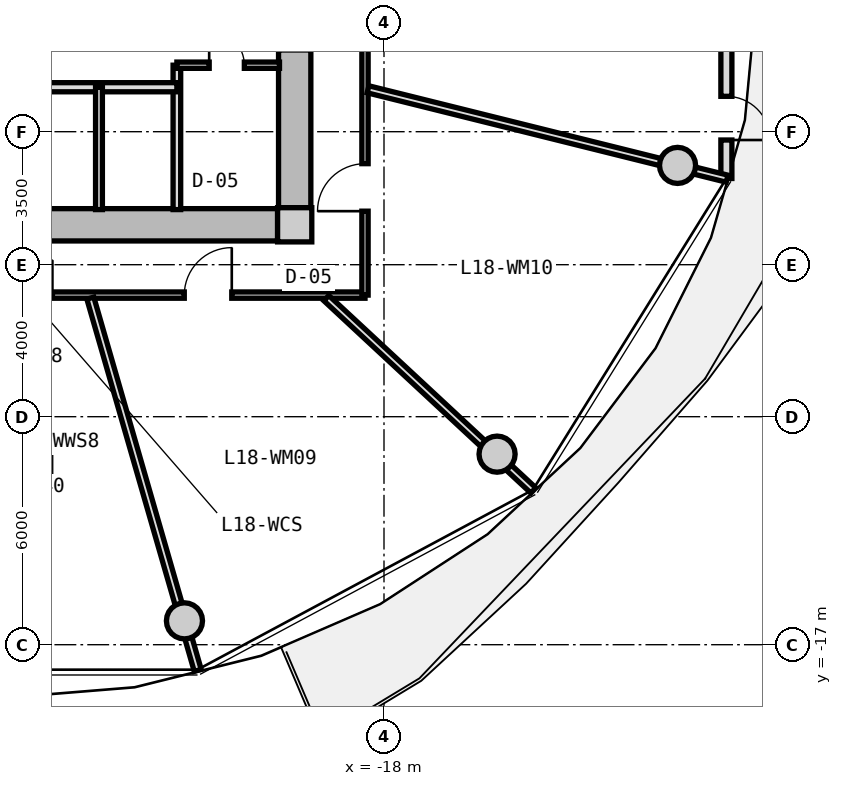
"""IFC4 building model, lengths in metres.
Left out: names, types, materials, properties, quantities, classifications, styles, units other than length and angle.
Written with IfcOpenShell. Run it as: python <this file> out.ifc"""

import sys

from ifc_helpers import new_model, si_unit, direction, frame, frame_2d, origin, origin_2d, place, context, subcontext, project, spatial, rectangle, circle, extrude, source, transform, mapped, element, fill, save


model = new_model("IFC4")
c1 = context("Model", 3, precision=1e-05, world=origin(), true_north=direction((0.0, 1.0)))
c2 = subcontext(c1, "Body", "Model", "MODEL_VIEW")
j1 = project(units=[si_unit("LENGTHUNIT", "METRE"), si_unit("PLANEANGLEUNIT", "RADIAN")], contexts=[c1])
p1 = place(None, origin())
s1 = spatial("IfcSite", under=j1, at=p1, CompositionType="ELEMENT")
p2 = place(p1, origin())
s2 = spatial("IfcBuilding", under=s1, at=p2, CompositionType="ELEMENT")
p3 = place(p2, frame((0.0, 0.0, 61.25)))
s3 = spatial("IfcBuildingStorey", under=s2, at=p3, CompositionType="ELEMENT", Elevation=61.25)
m1 = source(origin(), c2, "Body", "SweptSolid", [
    extrude(rectangle(XDim=0.9, YDim=0.9, at=origin_2d()), origin(), (0.0, 0.0, 1.0), 3.05),
])
p4 = place(p3, frame((-20.35, -5.95, 0.0), z_axis=(0.0, 0.0, 1.0), x_axis=(1.0, 0.0, 0.0)))
e1 = element("IfcColumn", 1, at=p4, inside=s3, PredefinedType="COLUMN", context=c2, shape_type="MappedRepresentation", body=[
    mapped(m1, transform((0.0, 0.0, 0.0), x_axis=(1.0, 0.0, 0.0), y_axis=(0.0, 1.0, 0.0), z_axis=(0.0, 0.0, 1.0), scale=1.0)),
])
m2 = source(origin(), c2, "Body", "SweptSolid", [
    extrude(rectangle(XDim=14.4, YDim=0.85, at=frame_2d((7.2, 0.0))), origin(), (0.0, 0.0, 1.0), 2.79),
])
p5 = place(p3, frame((-20.8, -5.95, 0.0), z_axis=(0.0, 0.0, 1.0), x_axis=(-1.0, 0.0, 0.0)))
e2 = element("IfcWall", 2, at=p5, inside=s3, PredefinedType="SHEAR", context=c2, shape_type="MappedRepresentation", body=[
    mapped(m2, transform((0.0, 0.0, 0.0), x_axis=(1.0, 0.0, 0.0), y_axis=(0.0, 1.0, 0.0), z_axis=(0.0, 0.0, 1.0), scale=1.0)),
])
m3 = source(origin(), c2, "Body", "SweptSolid", [
    extrude(rectangle(XDim=11.0, YDim=0.85, at=frame_2d((5.5, 0.0))), origin(), (0.0, 0.0, 1.0), 2.79),
])
p6 = place(p3, frame((-20.35, 5.5, 0.0), z_axis=(0.0, 0.0, 1.0), x_axis=(0.0, -1.0, 0.0)))
e3 = element("IfcWall", 3, at=p6, inside=s3, PredefinedType="SHEAR", context=c2, shape_type="MappedRepresentation", body=[
    mapped(m3, transform((0.0, 0.0, 0.0), x_axis=(1.0, 0.0, 0.0), y_axis=(0.0, 1.0, 0.0), z_axis=(0.0, 0.0, 1.0), scale=1.0)),
])
p7 = place(p6, frame((5.65, 0.0, 0.0)))
e4 = element("IfcOpeningElement", 4, at=p7, cuts=e3, PredefinedType="OPENING", context=c2, shape_type="SweptSolid", body=[
    extrude(rectangle(XDim=1.2, YDim=2.15, at=frame_2d((0.6, 1.075))), frame((0.0, 0.435, 0.0), z_axis=(0.0, -1.0, 0.0), x_axis=(1.0, 0.0, 0.0)), (0.0, 0.0, 1.0), 0.87),
])
m4 = source(origin(), c2, "Body", "SweptSolid", [
    extrude(circle(Radius=0.475, at=origin_2d()), origin(), (0.0, 0.0, 1.0), 3.05),
])
for number, where, z_axis, x_axis in (
    (5, (-23.251, -16.373, 0.0), (0.0, 0.0, 1.0), (1.0, 0.0, 0.0)),
    (6, (-15.025, -11.985, 0.0), (0.0, 0.0, 1.0), (1.0, 0.0, 0.0)),
    (7, (-10.275, -4.387, 0.0), (0.0, 0.0, 1.0), (1.0, 0.0, 0.0)),
):
    element("IfcColumn", number, at=place(p3, frame(where, z_axis=z_axis, x_axis=x_axis)), inside=s3, PredefinedType="COLUMN", context=c2, shape_type="MappedRepresentation", body=[
        mapped(m4, transform((0.0, 0.0, 0.0), x_axis=(1.0, 0.0, 0.0), y_axis=(0.0, 1.0, 0.0), z_axis=(0.0, 0.0, 1.0), scale=1.0)),
    ])
m5 = source(origin(), c2, "Body", "SweptSolid", [
    extrude(rectangle(XDim=9.462, YDim=0.29, at=frame_2d((4.731, 0.0))), origin(), (0.0, 0.0, 1.0), 2.79),
])
p8 = place(p3, frame((-8.99, 4.731, 0.0), z_axis=(0.0, 0.0, 1.0), x_axis=(0.0, -1.0, 0.0)))
e8 = element("IfcWall", 8, at=p8, inside=s3, PredefinedType="SOLIDWALL", context=c2, shape_type="MappedRepresentation", body=[
    mapped(m5, transform((0.0, 0.0, 0.0), x_axis=(1.0, 0.0, 0.0), y_axis=(0.0, 1.0, 0.0), z_axis=(0.0, 0.0, 1.0), scale=1.0)),
])
p9 = place(p8, frame((7.3, 0.0, 0.0)))
e9 = element("IfcOpeningElement", 9, at=p9, cuts=e8, PredefinedType="OPENING", context=c2, shape_type="SweptSolid", body=[
    extrude(rectangle(XDim=1.15, YDim=2.25, at=frame_2d((0.575, 1.125))), frame((0.0, 0.155, 0.0), z_axis=(0.0, -1.0, 0.0), x_axis=(1.0, 0.0, 0.0)), (0.0, 0.0, 1.0), 0.31),
])
p10 = place(p8, frame((0.85, 0.0, 0.85)))
e10 = element("IfcOpeningElement", 10, at=p10, cuts=e8, PredefinedType="OPENING", context=c2, shape_type="SweptSolid", body=[
    extrude(rectangle(XDim=1.2, YDim=1.5, at=frame_2d((0.6, 0.75))), frame((0.0, 0.155, 0.0), z_axis=(0.0, -1.0, 0.0), x_axis=(1.0, 0.0, 0.0)), (0.0, 0.0, 1.0), 0.31),
])
m6 = source(origin(), c2, "Body", "SweptSolid", [
    extrude(rectangle(XDim=3.8, YDim=0.2, at=frame_2d((1.9, 0.0))), origin(), (0.0, 0.0, 1.0), 2.775),
])
p11 = place(p3, frame((-23.45, -5.55, 0.0), z_axis=(0.0, 0.0, 1.0), x_axis=(0.0, 1.0, 0.0)))
e11 = element("IfcWall", 11, at=p11, inside=s3, PredefinedType="PARTITIONING", context=c2, shape_type="MappedRepresentation", body=[
    mapped(m6, transform((0.0, 0.0, 0.0), x_axis=(1.0, 0.0, 0.0), y_axis=(0.0, 1.0, 0.0), z_axis=(0.0, 0.0, 1.0), scale=1.0)),
])
m7 = source(origin(), c2, "Body", "SweptSolid", [
    extrude(rectangle(XDim=4.13, YDim=0.24, at=frame_2d((2.065, 0.0))), origin(), (0.0, 0.0, 1.0), 2.775),
])
p12 = place(p3, frame((-27.58, -2.33, 0.0), z_axis=(0.0, 0.0, 1.0), x_axis=(1.0, 0.0, 0.0)))
e12 = element("IfcWall", 12, at=p12, inside=s3, PredefinedType="PARTITIONING", context=c2, shape_type="MappedRepresentation", body=[
    mapped(m7, transform((0.0, 0.0, 0.0), x_axis=(1.0, 0.0, 0.0), y_axis=(0.0, 1.0, 0.0), z_axis=(0.0, 0.0, 1.0), scale=1.0)),
])
m8 = source(origin(), c2, "Body", "SweptSolid", [
    extrude(rectangle(XDim=3.22, YDim=0.18, at=frame_2d((1.61, 0.0))), origin(), (0.0, 0.0, 1.0), 2.775),
])
p13 = place(p3, frame((-25.5, -5.55, 0.0), z_axis=(0.0, 0.0, 1.0), x_axis=(0.0, 1.0, 0.0)))
e13 = element("IfcWall", 13, at=p13, inside=s3, PredefinedType="PARTITIONING", context=c2, shape_type="MappedRepresentation", body=[
    mapped(m8, transform((0.0, 0.0, 0.0), x_axis=(1.0, 0.0, 0.0), y_axis=(0.0, 1.0, 0.0), z_axis=(0.0, 0.0, 1.0), scale=1.0)),
])
m9 = source(origin(), c2, "Body", "SweptSolid", [
    extrude(rectangle(XDim=2.7, YDim=0.165, at=frame_2d((1.35, 0.0))), origin(), (0.0, 0.0, 1.0), 2.775),
])
p14 = place(p3, frame((-23.45, -1.75, 0.0), z_axis=(0.0, 0.0, 1.0), x_axis=(1.0, 0.0, 0.0)))
e14 = element("IfcWall", 14, at=p14, inside=s3, PredefinedType="PARTITIONING", context=c2, shape_type="MappedRepresentation", body=[
    mapped(m9, transform((0.0, 0.0, 0.0), x_axis=(1.0, 0.0, 0.0), y_axis=(0.0, 1.0, 0.0), z_axis=(0.0, 0.0, 1.0), scale=1.0)),
])
p15 = place(p14, frame((0.85, 0.0, 0.0)))
e15 = element("IfcOpeningElement", 15, at=p15, cuts=e14, PredefinedType="OPENING", context=c2, shape_type="SweptSolid", body=[
    extrude(rectangle(XDim=0.925, YDim=2.1, at=frame_2d((0.462, 1.05))), frame((0.0, 0.093, 0.0), z_axis=(0.0, -1.0, 0.0), x_axis=(1.0, 0.0, 0.0)), (0.0, 0.0, 1.0), 0.185),
])
m10 = source(origin(), c2, "Body", "SweptSolid", [
    extrude(rectangle(XDim=19.0, YDim=0.165, at=frame_2d((9.5, 0.0))), origin(), (0.0, 0.0, 1.0), 2.775),
])
p16 = place(p3, frame((-18.5, -7.8, 0.0), z_axis=(0.0, 0.0, 1.0), x_axis=(-1.0, 0.0, 0.0)))
e16 = element("IfcWall", 16, at=p16, inside=s3, PredefinedType="PARTITIONING", context=c2, shape_type="MappedRepresentation", body=[
    mapped(m10, transform((0.0, 0.0, 0.0), x_axis=(1.0, 0.0, 0.0), y_axis=(0.0, 1.0, 0.0), z_axis=(0.0, 0.0, 1.0), scale=1.0)),
])
p17 = place(p16, frame((14.244, 0.0, 0.0)))
e17 = element("IfcOpeningElement", 17, at=p17, cuts=e16, PredefinedType="OPENING", context=c2, shape_type="SweptSolid", body=[
    extrude(rectangle(XDim=1.25, YDim=2.2, at=frame_2d((0.625, 1.1))), frame((0.0, 0.093, 0.0), z_axis=(0.0, -1.0, 0.0), x_axis=(1.0, 0.0, 0.0)), (0.0, 0.0, 1.0), 0.185),
])
p18 = place(p16, frame((10.523, 0.0, 0.0)))
e18 = element("IfcOpeningElement", 18, at=p18, cuts=e16, PredefinedType="OPENING", context=c2, shape_type="SweptSolid", body=[
    extrude(rectangle(XDim=0.92, YDim=2.1, at=frame_2d((0.46, 1.05))), frame((0.0, 0.093, 0.0), z_axis=(0.0, -1.0, 0.0), x_axis=(1.0, 0.0, 0.0)), (0.0, 0.0, 1.0), 0.185),
])
p19 = place(p16, frame((8.226, 0.0, 0.0)))
e19 = element("IfcOpeningElement", 19, at=p19, cuts=e16, PredefinedType="OPENING", context=c2, shape_type="SweptSolid", body=[
    extrude(rectangle(XDim=0.92, YDim=2.1, at=frame_2d((0.46, 1.05))), frame((0.0, 0.093, 0.0), z_axis=(0.0, -1.0, 0.0), x_axis=(1.0, 0.0, 0.0)), (0.0, 0.0, 1.0), 0.185),
])
p20 = place(p16, frame((3.506, 0.0, 0.0)))
e20 = element("IfcOpeningElement", 20, at=p20, cuts=e16, PredefinedType="OPENING", context=c2, shape_type="SweptSolid", body=[
    extrude(rectangle(XDim=1.25, YDim=2.2, at=frame_2d((0.625, 1.1))), frame((0.0, 0.093, 0.0), z_axis=(0.0, -1.0, 0.0), x_axis=(1.0, 0.0, 0.0)), (0.0, 0.0, 1.0), 0.185),
])
m11 = source(origin(), c2, "Body", "SweptSolid", [
    extrude(rectangle(XDim=15.6, YDim=0.165, at=frame_2d((7.8, 0.0))), origin(), (0.0, 0.0, 1.0), 2.775),
])
p21 = place(p3, frame((-18.5, 7.8, 0.0), z_axis=(0.0, 0.0, 1.0), x_axis=(0.0, -1.0, 0.0)))
e21 = element("IfcWall", 21, at=p21, inside=s3, PredefinedType="PARTITIONING", context=c2, shape_type="MappedRepresentation", body=[
    mapped(m11, transform((0.0, 0.0, 0.0), x_axis=(1.0, 0.0, 0.0), y_axis=(0.0, 1.0, 0.0), z_axis=(0.0, 0.0, 1.0), scale=1.0)),
])
p22 = place(p21, frame((12.141, 0.0, 0.0)))
e22 = element("IfcOpeningElement", 22, at=p22, cuts=e21, PredefinedType="OPENING", context=c2, shape_type="SweptSolid", body=[
    extrude(rectangle(XDim=1.25, YDim=2.2, at=frame_2d((0.625, 1.1))), frame((0.0, 0.093, 0.0), z_axis=(0.0, -1.0, 0.0), x_axis=(1.0, 0.0, 0.0)), (0.0, 0.0, 1.0), 0.185),
])
p23 = place(p21, frame((7.175, 0.0, 0.0)))
e23 = element("IfcOpeningElement", 23, at=p23, cuts=e21, PredefinedType="OPENING", context=c2, shape_type="SweptSolid", body=[
    extrude(rectangle(XDim=1.25, YDim=2.2, at=frame_2d((0.625, 1.1))), frame((0.0, 0.093, 0.0), z_axis=(0.0, -1.0, 0.0), x_axis=(1.0, 0.0, 0.0)), (0.0, 0.0, 1.0), 0.185),
])
p24 = place(p21, frame((2.826, 0.0, 0.0)))
e24 = element("IfcOpeningElement", 24, at=p24, cuts=e21, PredefinedType="OPENING", context=c2, shape_type="SweptSolid", body=[
    extrude(rectangle(XDim=1.05, YDim=2.15, at=frame_2d((0.525, 1.075))), frame((0.0, 0.093, 0.0), z_axis=(0.0, -1.0, 0.0), x_axis=(1.0, 0.0, 0.0)), (0.0, 0.0, 1.0), 0.185),
])
p25 = place(p21, frame((0.881, 0.0, 0.0)))
e25 = element("IfcOpeningElement", 25, at=p25, cuts=e21, PredefinedType="OPENING", context=c2, shape_type="SweptSolid", body=[
    extrude(rectangle(XDim=1.05, YDim=2.15, at=frame_2d((0.525, 1.075))), frame((0.0, 0.093, 0.0), z_axis=(0.0, -1.0, 0.0), x_axis=(1.0, 0.0, 0.0)), (0.0, 0.0, 1.0), 0.185),
])
m12 = source(origin(), c2, "Body", "SweptSolid", [
    extrude(rectangle(XDim=10.196, YDim=0.19, at=frame_2d((5.098, 0.0))), origin(), (0.0, 0.0, 1.0), 2.225),
])
p26 = place(p3, frame((-25.727, -7.88, 0.0), z_axis=(0.0, 0.0, 1.0), x_axis=(0.277136420347, -0.960830580549, 0.0)))
e26 = element("IfcWall", 26, at=p26, inside=s3, PredefinedType="PARTITIONING", context=c2, shape_type="MappedRepresentation", body=[
    mapped(m12, transform((0.0, 0.0, 0.0), x_axis=(1.0, 0.0, 0.0), y_axis=(0.0, 1.0, 0.0), z_axis=(0.0, 0.0, 1.0), scale=1.0)),
])
m13 = source(origin(), c2, "Body", "SweptSolid", [
    extrude(rectangle(XDim=7.435, YDim=0.19, at=frame_2d((3.717, 0.0))), origin(), (0.0, 0.0, 1.0), 2.225),
])
p27 = place(p3, frame((-19.517, -7.88, 0.0), z_axis=(0.0, 0.0, 1.0), x_axis=(0.732651956848, -0.680603489652, 0.0)))
e27 = element("IfcWall", 27, at=p27, inside=s3, PredefinedType="PARTITIONING", context=c2, shape_type="MappedRepresentation", body=[
    mapped(m13, transform((0.0, 0.0, 0.0), x_axis=(1.0, 0.0, 0.0), y_axis=(0.0, 1.0, 0.0), z_axis=(0.0, 0.0, 1.0), scale=1.0)),
])
m14 = source(origin(), c2, "Body", "SweptSolid", [
    extrude(rectangle(XDim=9.737, YDim=0.19, at=frame_2d((4.869, 0.0))), origin(), (0.0, 0.0, 1.0), 2.225),
])
p28 = place(p3, frame((-18.42, -2.385, 0.0), z_axis=(0.0, 0.0, 1.0), x_axis=(0.970392716238, -0.241532557375, 0.0)))
e28 = element("IfcWall", 28, at=p28, inside=s3, PredefinedType="PARTITIONING", context=c2, shape_type="MappedRepresentation", body=[
    mapped(m14, transform((0.0, 0.0, 0.0), x_axis=(1.0, 0.0, 0.0), y_axis=(0.0, 1.0, 0.0), z_axis=(0.0, 0.0, 1.0), scale=1.0)),
])
m15 = source(origin(), c2, "Body", "SweptSolid", [
    extrude(rectangle(XDim=1.15, YDim=2.25, at=frame_2d((0.575, 1.125))), frame((0.0, 0.025, 0.0), z_axis=(0.0, -1.0, 0.0), x_axis=(1.0, 0.0, 0.0)), (0.0, 0.0, 1.0), 0.05),
])
p29 = place(p9, origin())
e29 = element("IfcDoor", 29, at=p29, inside=s3, OperationType="SINGLE_SWING_RIGHT", PredefinedType="DOOR", context=c2, shape_type="MappedRepresentation", body=[
    mapped(m15, transform((0.0, 0.0, 0.0), x_axis=(1.0, 0.0, 0.0), y_axis=(0.0, 1.0, 0.0), z_axis=(0.0, 0.0, 1.0), scale=1.0)),
])
fill(e9, e29)
m16 = source(origin(), c2, "Body", "SweptSolid", [
    extrude(rectangle(XDim=0.925, YDim=2.1, at=frame_2d((0.462, 1.05))), frame((0.0, 0.025, 0.0), z_axis=(0.0, -1.0, 0.0), x_axis=(1.0, 0.0, 0.0)), (0.0, 0.0, 1.0), 0.05),
])
p30 = place(p15, origin())
e30 = element("IfcDoor", 30, at=p30, inside=s3, OperationType="SINGLE_SWING_LEFT", PredefinedType="DOOR", context=c2, shape_type="MappedRepresentation", body=[
    mapped(m16, transform((0.0, 0.0, 0.0), x_axis=(1.0, 0.0, 0.0), y_axis=(0.0, 1.0, 0.0), z_axis=(0.0, 0.0, 1.0), scale=1.0)),
])
fill(e15, e30)
m17 = source(origin(), c2, "Body", "SweptSolid", [
    extrude(rectangle(XDim=0.92, YDim=2.1, at=frame_2d((0.46, 1.05))), frame((0.0, 0.025, 0.0), z_axis=(0.0, -1.0, 0.0), x_axis=(1.0, 0.0, 0.0)), (0.0, 0.0, 1.0), 0.05),
])
p31 = place(p19, frame((0.92, 0.0, 0.0), z_axis=(0.0, 0.0, 1.0), x_axis=(-1.0, 0.0, 0.0)))
e31 = element("IfcDoor", 31, at=p31, inside=s3, OperationType="SINGLE_SWING_RIGHT", PredefinedType="DOOR", context=c2, shape_type="MappedRepresentation", body=[
    mapped(m17, transform((0.0, 0.0, 0.0), x_axis=(1.0, 0.0, 0.0), y_axis=(0.0, 1.0, 0.0), z_axis=(0.0, 0.0, 1.0), scale=1.0)),
])
fill(e19, e31)
m18 = source(origin(), c2, "Body", "SweptSolid", [
    extrude(rectangle(XDim=1.25, YDim=2.2, at=frame_2d((0.625, 1.1))), frame((0.0, 0.025, 0.0), z_axis=(0.0, -1.0, 0.0), x_axis=(1.0, 0.0, 0.0)), (0.0, 0.0, 1.0), 0.05),
])
p32 = place(p20, frame((1.25, 0.0, 0.0), z_axis=(0.0, 0.0, 1.0), x_axis=(-1.0, 0.0, 0.0)))
e32 = element("IfcDoor", 32, at=p32, inside=s3, OperationType="SINGLE_SWING_RIGHT", PredefinedType="DOOR", context=c2, shape_type="MappedRepresentation", body=[
    mapped(m18, transform((0.0, 0.0, 0.0), x_axis=(1.0, 0.0, 0.0), y_axis=(0.0, 1.0, 0.0), z_axis=(0.0, 0.0, 1.0), scale=1.0)),
])
fill(e20, e32)
p33 = place(p22, frame((1.25, 0.0, 0.0), z_axis=(0.0, 0.0, 1.0), x_axis=(-1.0, 0.0, 0.0)))
e33 = element("IfcDoor", 33, at=p33, inside=s3, OperationType="SINGLE_SWING_LEFT", PredefinedType="DOOR", context=c2, shape_type="MappedRepresentation", body=[
    mapped(m18, transform((0.0, 0.0, 0.0), x_axis=(1.0, 0.0, 0.0), y_axis=(0.0, 1.0, 0.0), z_axis=(0.0, 0.0, 1.0), scale=1.0)),
])
fill(e22, e33)
save(model, sys.argv[1])
